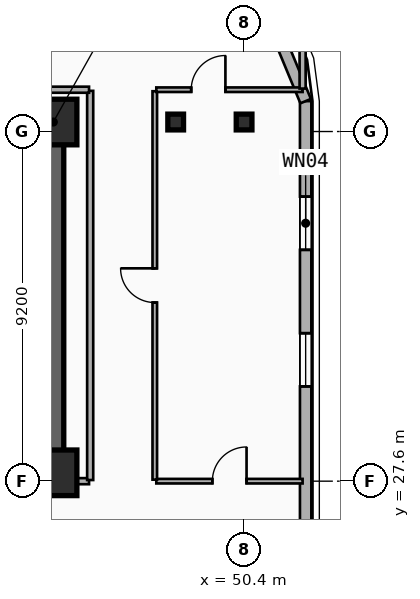
"""IFC4 building model, lengths in metres.
Left out: names, types, materials, properties, quantities, classifications, styles, units other than length and angle.
Written with IfcOpenShell. Run it as: python <this file> out.ifc"""

import sys

from ifc_helpers import new_model, si_unit, direction, frame, frame_2d, origin, origin_2d, place, context, subcontext, project, spatial, rectangle, i_section, extrude, element, fill, save


model = new_model("IFC4")
c1 = context("Model", 3, precision=1e-05, world=origin(), true_north=direction((0.0, 1.0)))
c2 = subcontext(c1, "Body", "Model", "MODEL_VIEW")
j1 = project(units=[si_unit("LENGTHUNIT", "METRE"), si_unit("PLANEANGLEUNIT", "RADIAN")], contexts=[c1])
p1 = place(None, origin())
s1 = spatial("IfcSite", under=j1, at=p1, CompositionType="ELEMENT")
p2 = place(p1, origin())
s2 = spatial("IfcBuilding", under=s1, at=p2, CompositionType="ELEMENT")
p3 = place(p2, frame((0.0, 0.0, 144.8)))
s3 = spatial("IfcBuildingStorey", under=s2, at=p3, CompositionType="ELEMENT", Elevation=144.8)
p4 = place(p3, frame((12.15, 37.05, 0.0), z_axis=(0.0, 0.0, 1.0), x_axis=(1.0, 0.0, 0.0)))
e1 = element("IfcWall", 1, at=p4, inside=s3, PredefinedType="SHEAR", context=c2, shape_type="SweptSolid", body=[
    extrude(rectangle(XDim=33.23, YDim=0.55, at=frame_2d((16.615, 0.0))), origin(), (0.0, 0.0, 1.0), 3.55),
])
p5 = place(p3, frame((45.38, 27.82, 0.0), z_axis=(0.0, 0.0, 1.0), x_axis=(-1.0, 0.0, 0.0)))
e2 = element("IfcWall", 2, at=p5, inside=s3, PredefinedType="SHEAR", context=c2, shape_type="SweptSolid", body=[
    extrude(rectangle(XDim=12.23, YDim=0.55, at=frame_2d((6.115, 0.0))), origin(), (0.0, 0.0, 1.0), 3.55),
])
p6 = place(p5, frame((9.93, 0.0, 0.0)))
e3 = element("IfcOpeningElement", 3, at=p6, cuts=e2, PredefinedType="OPENING", context=c2, shape_type="SweptSolid", body=[
    extrude(rectangle(XDim=1.1, YDim=2.15, at=frame_2d((0.55, 1.075))), frame((0.0, 0.285, 0.0), z_axis=(0.0, -1.0, 0.0), x_axis=(1.0, 0.0, 0.0)), (0.0, 0.0, 1.0), 0.57),
])
p7 = place(p5, frame((6.23, 0.0, 0.0)))
e4 = element("IfcOpeningElement", 4, at=p7, cuts=e2, PredefinedType="OPENING", context=c2, shape_type="SweptSolid", body=[
    extrude(rectangle(XDim=1.1, YDim=2.15, at=frame_2d((0.55, 1.075))), frame((0.0, 0.285, 0.0), z_axis=(0.0, -1.0, 0.0), x_axis=(1.0, 0.0, 0.0)), (0.0, 0.0, 1.0), 0.57),
])
p8 = place(p3, frame((45.38, 28.095, 0.0), z_axis=(0.0, 0.0, 1.0), x_axis=(0.0, 1.0, 0.0)))
e5 = element("IfcWall", 5, at=p8, inside=s3, PredefinedType="SHEAR", context=c2, shape_type="SweptSolid", body=[
    extrude(rectangle(XDim=8.68, YDim=0.55, at=frame_2d((4.34, 0.0))), origin(), (0.0, 0.0, 1.0), 3.55),
])
for number, where, z_axis, x_axis in (
    (6, (45.4, 27.82, 0.0), (0.0, 0.0, 1.0), (1.0, 0.0, 0.0)),
    (7, (45.4, 37.05, 0.0), (0.0, 0.0, 1.0), (1.0, 0.0, 0.0)),
):
    element("IfcColumn", number, at=place(p3, frame(where, z_axis=z_axis, x_axis=x_axis)), inside=s3, PredefinedType="COLUMN", context=c2, shape_type="SweptSolid", body=[
        extrude(rectangle(XDim=1.2, YDim=1.2, at=origin_2d()), origin(), (0.0, 0.0, 1.0), 3.55),
    ])
for number, where, z_axis, x_axis in (
    (8, (48.6, 37.05, 0.0), (0.0, 0.0, 1.0), (1.0, 0.0, 0.0)),
    (9, (50.4, 37.05, 0.0), (0.0, 0.0, 1.0), (1.0, 0.0, 0.0)),
):
    element("IfcColumn", number, at=place(p3, frame(where, z_axis=z_axis, x_axis=x_axis)), inside=s3, PredefinedType="COLUMN", context=c2, shape_type="SweptSolid", body=[
        extrude(i_section(OverallWidth=0.413, OverallDepth=0.415, WebThickness=0.03, FlangeThickness=0.047, FilletRadius=0.015, at=origin_2d()), origin(), (0.0, 0.0, 1.0), 3.55),
    ])
p9 = place(p3, frame((52.02, 37.6, 0.0), z_axis=(0.0, 0.0, 1.0), x_axis=(0.0, -1.0, 0.0)))
e10 = element("IfcWall", 10, at=p9, inside=s3, PredefinedType="SOLIDWALL", context=c2, shape_type="SweptSolid", body=[
    extrude(rectangle(XDim=23.0, YDim=0.3, at=frame_2d((11.5, 0.0))), origin(), (0.0, 0.0, 1.0), 3.29),
])
p10 = place(p9, frame((2.513, 0.0, 0.34)))
e11 = element("IfcOpeningElement", 11, at=p10, cuts=e10, PredefinedType="OPENING", context=c2, shape_type="SweptSolid", body=[
    extrude(rectangle(XDim=1.4, YDim=2.1, at=frame_2d((0.7, 1.05))), frame((0.0, 0.16, 0.0), z_axis=(0.0, -1.0, 0.0), x_axis=(1.0, 0.0, 0.0)), (0.0, 0.0, 1.0), 0.32),
])
p11 = place(p9, frame((6.107, 0.0, 0.34)))
e12 = element("IfcOpeningElement", 12, at=p11, cuts=e10, PredefinedType="OPENING", context=c2, shape_type="SweptSolid", body=[
    extrude(rectangle(XDim=1.4, YDim=2.1, at=frame_2d((0.7, 1.05))), frame((0.0, 0.16, 0.0), z_axis=(0.0, -1.0, 0.0), x_axis=(1.0, 0.0, 0.0)), (0.0, 0.0, 1.0), 0.32),
])
p12 = place(p9, frame((14.86, 0.0, 0.34)))
e13 = element("IfcOpeningElement", 13, at=p12, cuts=e10, PredefinedType="OPENING", context=c2, shape_type="SweptSolid", body=[
    extrude(rectangle(XDim=1.4, YDim=2.1, at=frame_2d((0.7, 1.05))), frame((0.0, 0.16, 0.0), z_axis=(0.0, -1.0, 0.0), x_axis=(1.0, 0.0, 0.0)), (0.0, 0.0, 1.0), 0.32),
])
p13 = place(p9, frame((18.77, 0.0, 0.34)))
e14 = element("IfcOpeningElement", 14, at=p13, cuts=e10, PredefinedType="OPENING", context=c2, shape_type="SweptSolid", body=[
    extrude(rectangle(XDim=1.4, YDim=2.1, at=frame_2d((0.7, 1.05))), frame((0.0, 0.16, 0.0), z_axis=(0.0, -1.0, 0.0), x_axis=(1.0, 0.0, 0.0)), (0.0, 0.0, 1.0), 0.32),
])
p14 = place(p3, frame((50.843, 40.443, 0.0), z_axis=(0.0, 0.0, 1.0), x_axis=(0.382704529509, -0.923870793506, 0.0)))
e15 = element("IfcWall", 15, at=p14, inside=s3, PredefinedType="SOLIDWALL", context=c2, shape_type="SweptSolid", body=[
    extrude(rectangle(XDim=3.077, YDim=0.3, at=frame_2d((1.538, 0.0))), origin(), (0.0, 0.0, 1.0), 3.29),
])
p15 = place(p3, frame((48.09, 27.6, 0.0), z_axis=(0.0, 0.0, 1.0), x_axis=(1.0, 0.0, 0.0)))
e16 = element("IfcWall", 16, at=p15, inside=s3, PredefinedType="PARTITIONING", context=c2, shape_type="SweptSolid", body=[
    extrude(rectangle(XDim=3.85, YDim=0.12, at=frame_2d((1.925, 0.0))), origin(), (0.0, 0.0, 1.0), 2.62),
])
p16 = place(p15, frame((1.475, 0.0, 0.0)))
e17 = element("IfcOpeningElement", 17, at=p16, cuts=e16, PredefinedType="OPENING", context=c2, shape_type="SweptSolid", body=[
    extrude(rectangle(XDim=0.9, YDim=2.1, at=frame_2d((0.45, 1.05))), frame((0.0, 0.07, 0.0), z_axis=(0.0, -1.0, 0.0), x_axis=(1.0, 0.0, 0.0)), (0.0, 0.0, 1.0), 0.14),
])
p17 = place(p3, frame((48.05, 27.64, 0.0), z_axis=(0.0, 0.0, 1.0), x_axis=(0.0, 1.0, 0.0)))
e18 = element("IfcWall", 18, at=p17, inside=s3, PredefinedType="PARTITIONING", context=c2, shape_type="SweptSolid", body=[
    extrude(rectangle(XDim=10.22, YDim=0.12, at=frame_2d((5.11, 0.0))), origin(), (0.0, 0.0, 1.0), 2.77),
])
p18 = place(p17, frame((4.66, 0.0, 0.0)))
e19 = element("IfcOpeningElement", 19, at=p18, cuts=e18, PredefinedType="OPENING", context=c2, shape_type="SweptSolid", body=[
    extrude(rectangle(XDim=0.9, YDim=2.1, at=frame_2d((0.45, 1.05))), frame((0.0, 0.07, 0.0), z_axis=(0.0, -1.0, 0.0), x_axis=(1.0, 0.0, 0.0)), (0.0, 0.0, 1.0), 0.14),
])
p19 = place(p3, frame((48.09, 37.9, 0.0), z_axis=(0.0, 0.0, 1.0), x_axis=(1.0, 0.0, 0.0)))
e20 = element("IfcWall", 20, at=p19, inside=s3, PredefinedType="PARTITIONING", context=c2, shape_type="SweptSolid", body=[
    extrude(rectangle(XDim=3.85, YDim=0.12, at=frame_2d((1.925, 0.0))), origin(), (0.0, 0.0, 1.0), 3.29),
])
p20 = place(p19, frame((0.919, 0.0, 0.0)))
e21 = element("IfcOpeningElement", 21, at=p20, cuts=e20, PredefinedType="OPENING", context=c2, shape_type="SweptSolid", body=[
    extrude(rectangle(XDim=0.9, YDim=2.1, at=frame_2d((0.45, 1.05))), frame((0.0, 0.07, 0.0), z_axis=(0.0, -1.0, 0.0), x_axis=(1.0, 0.0, 0.0)), (0.0, 0.0, 1.0), 0.14),
])
p21 = place(p3, frame((45.41, 27.6, 0.0), z_axis=(0.0, 0.0, 1.0), x_axis=(1.0, 0.0, 0.0)))
e22 = element("IfcWall", 22, at=p21, inside=s3, PredefinedType="PARTITIONING", context=c2, shape_type="SweptSolid", body=[
    extrude(rectangle(XDim=0.91, YDim=0.16, at=frame_2d((0.455, 0.0))), origin(), (0.0, 0.0, 1.0), 2.36),
])
p22 = place(p3, frame((46.35, 27.63, 0.0), z_axis=(0.0, 0.0, 1.0), x_axis=(0.0, 1.0, 0.0)))
e23 = element("IfcWall", 23, at=p22, inside=s3, PredefinedType="PARTITIONING", context=c2, shape_type="SweptSolid", body=[
    extrude(rectangle(XDim=10.24, YDim=0.16, at=frame_2d((5.12, 0.0))), origin(), (0.0, 0.0, 1.0), 2.77),
])
p23 = place(p3, frame((11.28, 37.9, 0.0), z_axis=(0.0, 0.0, 1.0), x_axis=(1.0, 0.0, 0.0)))
e24 = element("IfcWall", 24, at=p23, inside=s3, PredefinedType="PARTITIONING", context=c2, shape_type="SweptSolid", body=[
    extrude(rectangle(XDim=35.04, YDim=0.16, at=frame_2d((17.52, 0.0))), origin(), (0.0, 0.0, 1.0), 3.29),
])
p24 = place(p3, frame((51.94, 37.93, 0.0), z_axis=(0.0, 0.0, 1.0), x_axis=(0.0, 1.0, 0.0)))
e25 = element("IfcWall", 25, at=p24, inside=s3, PredefinedType="PARTITIONING", context=c2, shape_type="SweptSolid", body=[
    extrude(rectangle(XDim=1.44, YDim=0.16, at=frame_2d((0.72, 0.0))), origin(), (0.0, 0.0, 1.0), 3.29),
])
p25 = place(p10, origin())
e26 = element("IfcWindow", 26, at=p25, inside=s3, PartitioningType="SINGLE_PANEL", PredefinedType="WINDOW", context=c2, shape_type="SweptSolid", body=[
    extrude(rectangle(XDim=1.4, YDim=2.1, at=frame_2d((0.7, 1.05))), frame((0.0, 0.03, 0.0), z_axis=(0.0, -1.0, 0.0), x_axis=(1.0, 0.0, 0.0)), (0.0, 0.0, 1.0), 0.06),
])
fill(e11, e26)
p26 = place(p11, origin())
e27 = element("IfcWindow", 27, at=p26, inside=s3, PartitioningType="SINGLE_PANEL", PredefinedType="WINDOW", context=c2, shape_type="SweptSolid", body=[
    extrude(rectangle(XDim=1.4, YDim=2.1, at=frame_2d((0.7, 1.05))), frame((0.0, 0.03, 0.0), z_axis=(0.0, -1.0, 0.0), x_axis=(1.0, 0.0, 0.0)), (0.0, 0.0, 1.0), 0.06),
])
fill(e12, e27)
p27 = place(p16, origin())
e28 = element("IfcDoor", 28, at=p27, inside=s3, OperationType="SINGLE_SWING_RIGHT", PredefinedType="DOOR", context=c2, shape_type="SweptSolid", body=[
    extrude(rectangle(XDim=0.9, YDim=2.1, at=frame_2d((0.45, 1.05))), frame((0.0, 0.025, 0.0), z_axis=(0.0, -1.0, 0.0), x_axis=(1.0, 0.0, 0.0)), (0.0, 0.0, 1.0), 0.05),
])
fill(e17, e28)
p28 = place(p18, origin())
e29 = element("IfcDoor", 29, at=p28, inside=s3, OperationType="SINGLE_SWING_RIGHT", PredefinedType="DOOR", context=c2, shape_type="SweptSolid", body=[
    extrude(rectangle(XDim=0.9, YDim=2.1, at=frame_2d((0.45, 1.05))), frame((0.0, 0.025, 0.0), z_axis=(0.0, -1.0, 0.0), x_axis=(1.0, 0.0, 0.0)), (0.0, 0.0, 1.0), 0.05),
])
fill(e19, e29)
p29 = place(p20, origin())
e30 = element("IfcDoor", 30, at=p29, inside=s3, OperationType="SINGLE_SWING_RIGHT", PredefinedType="DOOR", context=c2, shape_type="SweptSolid", body=[
    extrude(rectangle(XDim=0.9, YDim=2.1, at=frame_2d((0.45, 1.05))), frame((0.0, 0.025, 0.0), z_axis=(0.0, -1.0, 0.0), x_axis=(1.0, 0.0, 0.0)), (0.0, 0.0, 1.0), 0.05),
])
fill(e21, e30)
save(model, sys.argv[1])
